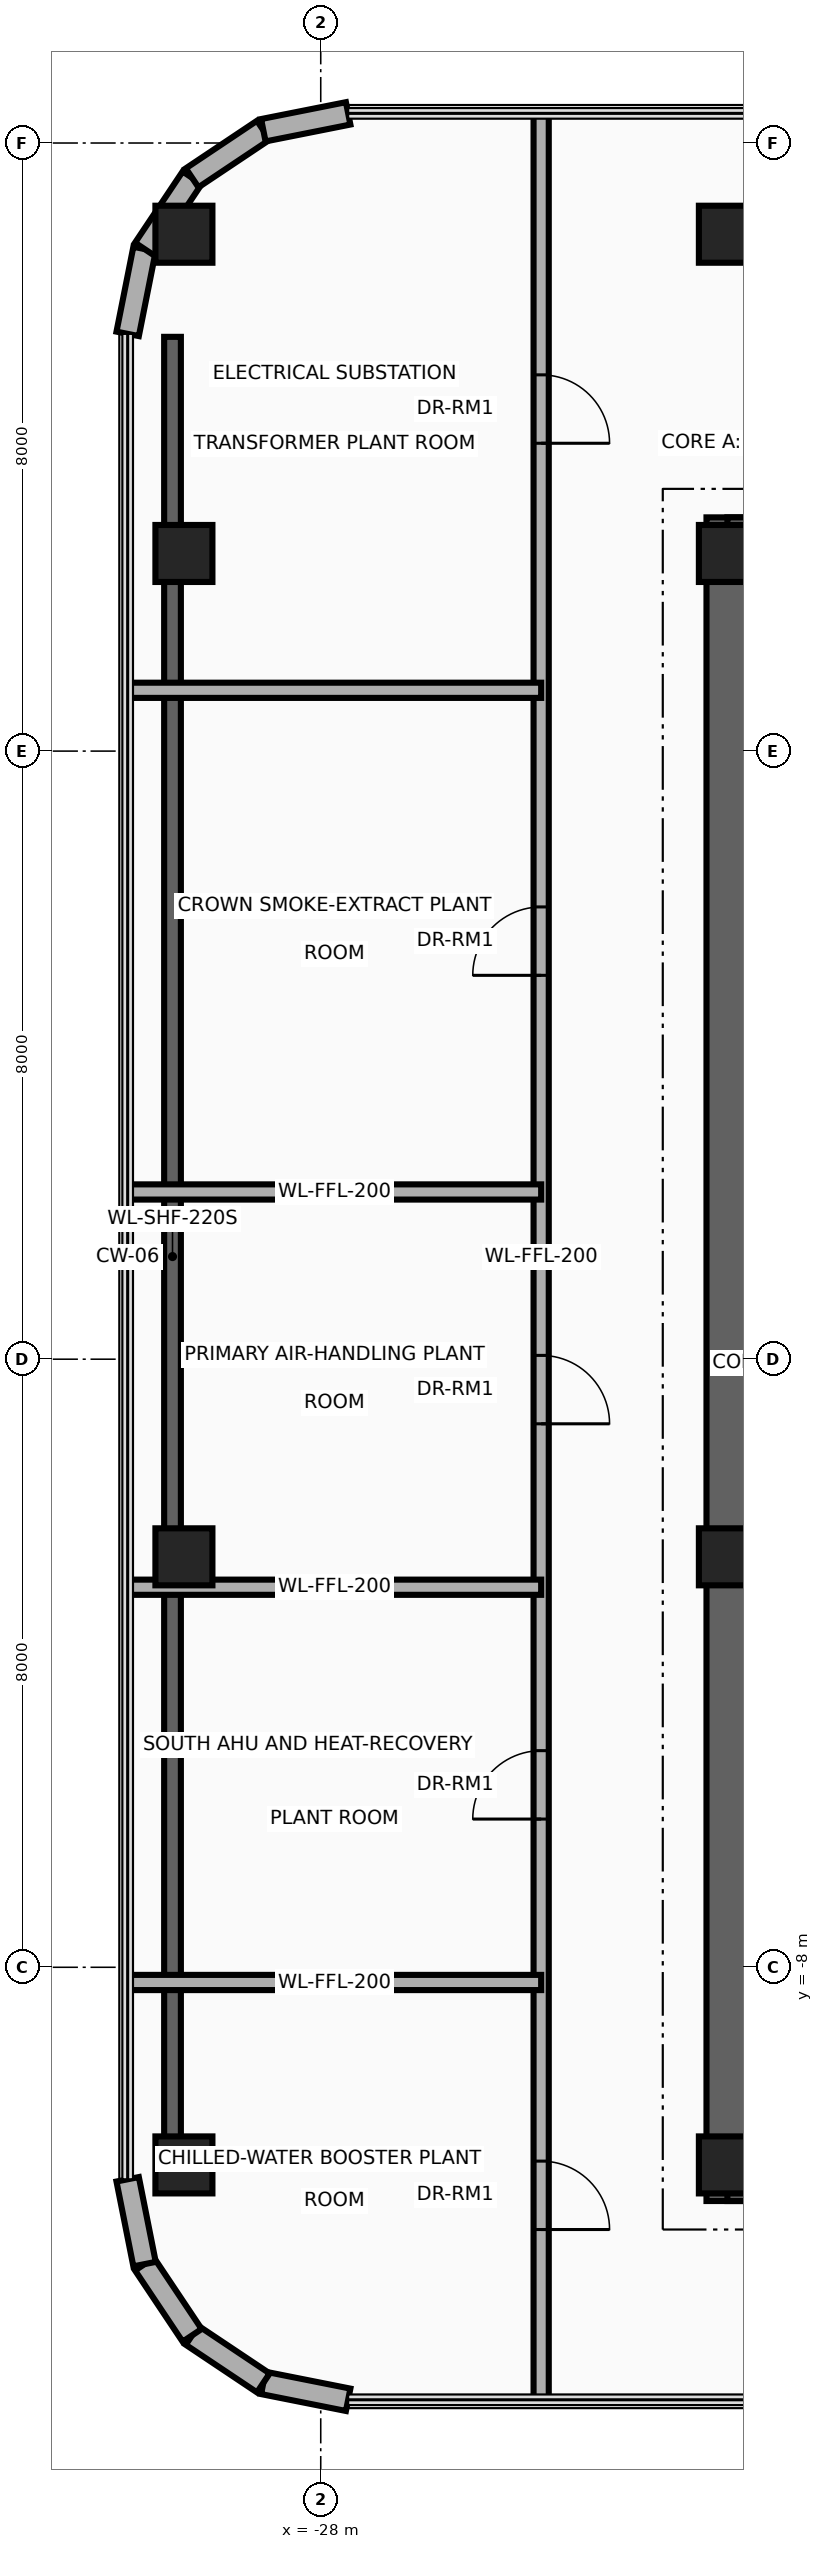
"""IFC4 building model, lengths in metres.
Left out: names, types, materials, properties, quantities, classifications, styles, units other than length and angle.
Written with IfcOpenShell. Run it as: python <this file> out.ifc"""

import sys

from ifc_helpers import new_model, si_unit, direction, frame, frame_2d, origin, origin_2d, place, context, subcontext, project, spatial, rectangle, extrude, source, transform, mapped, element, fill, save


model = new_model("IFC4")
c1 = context("Model", 3, precision=1e-05, world=origin(), true_north=direction((0.0, 1.0)))
c2 = subcontext(c1, "Body", "Model", "MODEL_VIEW")
j1 = project(units=[si_unit("LENGTHUNIT", "METRE"), si_unit("PLANEANGLEUNIT", "RADIAN")], contexts=[c1])
p1 = place(None, origin())
s1 = spatial("IfcSite", under=j1, at=p1, CompositionType="ELEMENT")
p2 = place(p1, origin())
s2 = spatial("IfcBuilding", under=s1, at=p2, CompositionType="ELEMENT")
p3 = place(p2, frame((0.0, 0.0, 303.6)))
s3 = spatial("IfcBuildingStorey", under=s2, at=p3, CompositionType="ELEMENT", Elevation=303.6)
p4 = place(p3, frame((-22.65, -11.075, 0.0), z_axis=(0.0, 0.0, 1.0), x_axis=(0.0, 1.0, 0.0)))
e1 = element("IfcWall", 1, at=p4, inside=s3, PredefinedType="SHEAR", context=c2, shape_type="SweptSolid", body=[
    extrude(rectangle(XDim=22.15, YDim=0.55, at=frame_2d((11.075, 0.0))), origin(), (0.0, 0.0, 1.0), 3.8),
])
for number, where, z_axis, x_axis in (
    (2, (-22.65, 10.8, 0.0), (0.0, 0.0, 1.0), (1.0, 0.0, 0.0)),
    (3, (-22.65, -10.8, 0.0), (0.0, 0.0, 1.0), (1.0, 0.0, 0.0)),
):
    element("IfcWall", number, at=place(p3, frame(where, z_axis=z_axis, x_axis=x_axis)), inside=s3, PredefinedType="SHEAR", context=c2, shape_type="SweptSolid", body=[
        extrude(rectangle(XDim=10.25, YDim=0.55, at=frame_2d((5.125, 0.0))), origin(), (0.0, 0.0, 1.0), 3.8),
    ])
m1 = source(origin(), c2, "Body", "SweptSolid", [
    extrude(rectangle(XDim=0.75, YDim=0.75, at=origin_2d()), origin(), (0.0, 0.0, 1.0), 4.0),
])
for number, where, z_axis, x_axis in (
    (4, (-29.8, -10.6, 0.0), (0.0, 0.0, 1.0), (1.0, 0.0, 0.0)),
    (5, (-22.65, -10.6, 0.0), (0.0, 0.0, 1.0), (1.0, 0.0, 0.0)),
    (6, (-29.8, -2.6, 0.0), (0.0, 0.0, 1.0), (1.0, 0.0, 0.0)),
    (7, (-22.65, -2.6, 0.0), (0.0, 0.0, 1.0), (1.0, 0.0, 0.0)),
    (8, (-29.8, 10.6, 0.0), (0.0, 0.0, 1.0), (1.0, 0.0, 0.0)),
    (9, (-22.65, 10.6, 0.0), (0.0, 0.0, 1.0), (1.0, 0.0, 0.0)),
    (10, (-29.8, 14.8, 0.0), (0.0, 0.0, 1.0), (1.0, 0.0, 0.0)),
    (11, (-22.65, 14.8, 0.0), (0.0, 0.0, 1.0), (1.0, 0.0, 0.0)),
):
    element("IfcColumn", number, at=place(p3, frame(where, z_axis=z_axis, x_axis=x_axis)), inside=s3, PredefinedType="COLUMN", context=c2, shape_type="MappedRepresentation", body=[
        mapped(m1, transform((0.0, 0.0, 0.0), x_axis=(1.0, 0.0, 0.0), y_axis=(0.0, 1.0, 0.0), z_axis=(0.0, 0.0, 1.0), scale=1.0)),
    ])
p5 = place(p3, frame((-29.95, -10.75, 0.0), z_axis=(0.0, 0.0, 1.0), x_axis=(0.0, 1.0, 0.0)))
e12 = element("IfcWall", 12, at=p5, inside=s3, PredefinedType="SHEAR", context=c2, shape_type="SweptSolid", body=[
    extrude(rectangle(XDim=24.2, YDim=0.22, at=frame_2d((12.1, 0.0))), origin(), (0.0, 0.0, 1.0), 4.22),
])
p6 = place(p3, frame((-30.54, 13.489, 0.0), z_axis=(0.0, 0.0, 1.0), x_axis=(0.195043173023, 0.980794657743, 0.0)))
e13 = element("IfcWall", 13, at=p6, inside=s3, PredefinedType="SOLIDWALL", context=c2, shape_type="SweptSolid", body=[
    extrude(rectangle(XDim=1.138, YDim=0.3, at=frame_2d((0.569, 0.0))), origin(), (0.0, 0.0, 1.0), 3.8),
])
for number, where, z_axis, x_axis in (
    (14, (-30.318, 14.605, 0.0), (0.0, 0.0, 1.0), (0.556, 0.831, 0.0)),
    (15, (-29.692, 15.542, 0.0), (0.0, 0.0, 1.0), (0.831, 0.556, 0.0)),
):
    element("IfcWall", number, at=place(p3, frame(where, z_axis=z_axis, x_axis=x_axis)), inside=s3, PredefinedType="SOLIDWALL", context=c2, shape_type="SweptSolid", body=[
        extrude(rectangle(XDim=1.127, YDim=0.3, at=frame_2d((0.563, 0.0))), origin(), (0.0, 0.0, 1.0), 3.8),
    ])
for number, where, z_axis, x_axis in (
    (16, (-28.755, 16.168, 0.0), (0.0, 0.0, 1.0), (0.981, 0.195, 0.0)),
    (17, (-27.639, -13.69, 0.0), (0.0, 0.0, 1.0), (-0.981, 0.195, 0.0)),
):
    element("IfcWall", number, at=place(p3, frame(where, z_axis=z_axis, x_axis=x_axis)), inside=s3, PredefinedType="SOLIDWALL", context=c2, shape_type="SweptSolid", body=[
        extrude(rectangle(XDim=1.138, YDim=0.3, at=frame_2d((0.569, 0.0))), origin(), (0.0, 0.0, 1.0), 3.8),
    ])
for number, where, z_axis, x_axis in (
    (18, (-28.755, -13.468, 0.0), (0.0, 0.0, 1.0), (-0.831, 0.556, 0.0)),
    (19, (-29.692, -12.842, 0.0), (0.0, 0.0, 1.0), (-0.556, 0.831, 0.0)),
):
    element("IfcWall", number, at=place(p3, frame(where, z_axis=z_axis, x_axis=x_axis)), inside=s3, PredefinedType="SOLIDWALL", context=c2, shape_type="SweptSolid", body=[
        extrude(rectangle(XDim=1.127, YDim=0.3, at=frame_2d((0.563, 0.0))), origin(), (0.0, 0.0, 1.0), 3.8),
    ])
p7 = place(p3, frame((-30.318, -11.905, 0.0), z_axis=(0.0, 0.0, 1.0), x_axis=(-0.195043173023, 0.980794657743, 0.0)))
e20 = element("IfcWall", 20, at=p7, inside=s3, PredefinedType="SOLIDWALL", context=c2, shape_type="SweptSolid", body=[
    extrude(rectangle(XDim=1.138, YDim=0.3, at=frame_2d((0.569, 0.0))), origin(), (0.0, 0.0, 1.0), 3.8),
])
p8 = place(p3, frame((-25.1, -13.69, 0.0), z_axis=(0.0, 0.0, 1.0), x_axis=(0.0, 1.0, 0.0)))
e21 = element("IfcWall", 21, at=p8, inside=s3, PredefinedType="PARTITIONING", context=c2, shape_type="SweptSolid", body=[
    extrude(rectangle(XDim=30.08, YDim=0.2, at=frame_2d((15.04, 0.0))), origin(), (0.0, 0.0, 1.0), 3.163),
])
p9 = place(p8, frame((2.24, 0.0, 0.0)))
e22 = element("IfcOpeningElement", 22, at=p9, cuts=e21, PredefinedType="OPENING", context=c2, shape_type="SweptSolid", body=[
    extrude(rectangle(XDim=0.9, YDim=2.1, at=frame_2d((0.45, 1.05))), frame((0.0, 0.115, 0.0), z_axis=(0.0, -1.0, 0.0), x_axis=(1.0, 0.0, 0.0)), (0.0, 0.0, 1.0), 0.23),
])
p10 = place(p8, frame((7.64, 0.0, 0.0)))
e23 = element("IfcOpeningElement", 23, at=p10, cuts=e21, PredefinedType="OPENING", context=c2, shape_type="SweptSolid", body=[
    extrude(rectangle(XDim=0.9, YDim=2.1, at=frame_2d((0.45, 1.05))), frame((0.0, 0.115, 0.0), z_axis=(0.0, -1.0, 0.0), x_axis=(1.0, 0.0, 0.0)), (0.0, 0.0, 1.0), 0.23),
])
p11 = place(p8, frame((12.84, 0.0, 0.0)))
e24 = element("IfcOpeningElement", 24, at=p11, cuts=e21, PredefinedType="OPENING", context=c2, shape_type="SweptSolid", body=[
    extrude(rectangle(XDim=0.9, YDim=2.1, at=frame_2d((0.45, 1.05))), frame((0.0, 0.115, 0.0), z_axis=(0.0, -1.0, 0.0), x_axis=(1.0, 0.0, 0.0)), (0.0, 0.0, 1.0), 0.23),
])
p12 = place(p8, frame((18.74, 0.0, 0.0)))
e25 = element("IfcOpeningElement", 25, at=p12, cuts=e21, PredefinedType="OPENING", context=c2, shape_type="SweptSolid", body=[
    extrude(rectangle(XDim=0.9, YDim=2.1, at=frame_2d((0.45, 1.05))), frame((0.0, 0.115, 0.0), z_axis=(0.0, -1.0, 0.0), x_axis=(1.0, 0.0, 0.0)), (0.0, 0.0, 1.0), 0.23),
])
p13 = place(p8, frame((25.74, 0.0, 0.0)))
e26 = element("IfcOpeningElement", 26, at=p13, cuts=e21, PredefinedType="OPENING", context=c2, shape_type="SweptSolid", body=[
    extrude(rectangle(XDim=0.9, YDim=2.1, at=frame_2d((0.45, 1.05))), frame((0.0, 0.115, 0.0), z_axis=(0.0, -1.0, 0.0), x_axis=(1.0, 0.0, 0.0)), (0.0, 0.0, 1.0), 0.23),
])
for number, where, z_axis, x_axis in (
    (27, (-30.54, -8.2, 0.0), (0.0, 0.0, 1.0), (1.0, 0.0, 0.0)),
    (28, (-30.54, -3.0, 0.0), (0.0, 0.0, 1.0), (1.0, 0.0, 0.0)),
    (29, (-30.54, 2.2, 0.0), (0.0, 0.0, 1.0), (1.0, 0.0, 0.0)),
    (30, (-30.54, 8.8, 0.0), (0.0, 0.0, 1.0), (1.0, 0.0, 0.0)),
):
    element("IfcWall", number, at=place(p3, frame(where, z_axis=z_axis, x_axis=x_axis)), inside=s3, PredefinedType="PARTITIONING", context=c2, shape_type="SweptSolid", body=[
        extrude(rectangle(XDim=5.44, YDim=0.2, at=frame_2d((2.72, 0.0))), origin(), (0.0, 0.0, 1.0), 3.246),
    ])
p14 = place(p9, frame((0.9, 0.0, 0.0), z_axis=(0.0, 0.0, 1.0), x_axis=(-1.0, 0.0, 0.0)))
e31 = element("IfcDoor", 31, at=p14, inside=s3, OperationType="SINGLE_SWING_LEFT", PredefinedType="DOOR", context=c2, shape_type="SweptSolid", body=[
    extrude(rectangle(XDim=0.9, YDim=2.1, at=frame_2d((0.45, 1.05))), frame((0.0, 0.025, 0.0), z_axis=(0.0, -1.0, 0.0), x_axis=(1.0, 0.0, 0.0)), (0.0, 0.0, 1.0), 0.05),
])
fill(e22, e31)
p15 = place(p10, origin())
e32 = element("IfcDoor", 32, at=p15, inside=s3, OperationType="SINGLE_SWING_RIGHT", PredefinedType="DOOR", context=c2, shape_type="SweptSolid", body=[
    extrude(rectangle(XDim=0.9, YDim=2.1, at=frame_2d((0.45, 1.05))), frame((0.0, 0.025, 0.0), z_axis=(0.0, -1.0, 0.0), x_axis=(1.0, 0.0, 0.0)), (0.0, 0.0, 1.0), 0.05),
])
fill(e23, e32)
p16 = place(p11, frame((0.9, 0.0, 0.0), z_axis=(0.0, 0.0, 1.0), x_axis=(-1.0, 0.0, 0.0)))
e33 = element("IfcDoor", 33, at=p16, inside=s3, OperationType="SINGLE_SWING_LEFT", PredefinedType="DOOR", context=c2, shape_type="SweptSolid", body=[
    extrude(rectangle(XDim=0.9, YDim=2.1, at=frame_2d((0.45, 1.05))), frame((0.0, 0.025, 0.0), z_axis=(0.0, -1.0, 0.0), x_axis=(1.0, 0.0, 0.0)), (0.0, 0.0, 1.0), 0.05),
])
fill(e24, e33)
p17 = place(p12, origin())
e34 = element("IfcDoor", 34, at=p17, inside=s3, OperationType="SINGLE_SWING_RIGHT", PredefinedType="DOOR", context=c2, shape_type="SweptSolid", body=[
    extrude(rectangle(XDim=0.9, YDim=2.1, at=frame_2d((0.45, 1.05))), frame((0.0, 0.025, 0.0), z_axis=(0.0, -1.0, 0.0), x_axis=(1.0, 0.0, 0.0)), (0.0, 0.0, 1.0), 0.05),
])
fill(e25, e34)
p18 = place(p13, frame((0.9, 0.0, 0.0), z_axis=(0.0, 0.0, 1.0), x_axis=(-1.0, 0.0, 0.0)))
e35 = element("IfcDoor", 35, at=p18, inside=s3, OperationType="SINGLE_SWING_LEFT", PredefinedType="DOOR", context=c2, shape_type="SweptSolid", body=[
    extrude(rectangle(XDim=0.9, YDim=2.1, at=frame_2d((0.45, 1.05))), frame((0.0, 0.025, 0.0), z_axis=(0.0, -1.0, 0.0), x_axis=(1.0, 0.0, 0.0)), (0.0, 0.0, 1.0), 0.05),
])
fill(e26, e35)
save(model, sys.argv[1])
